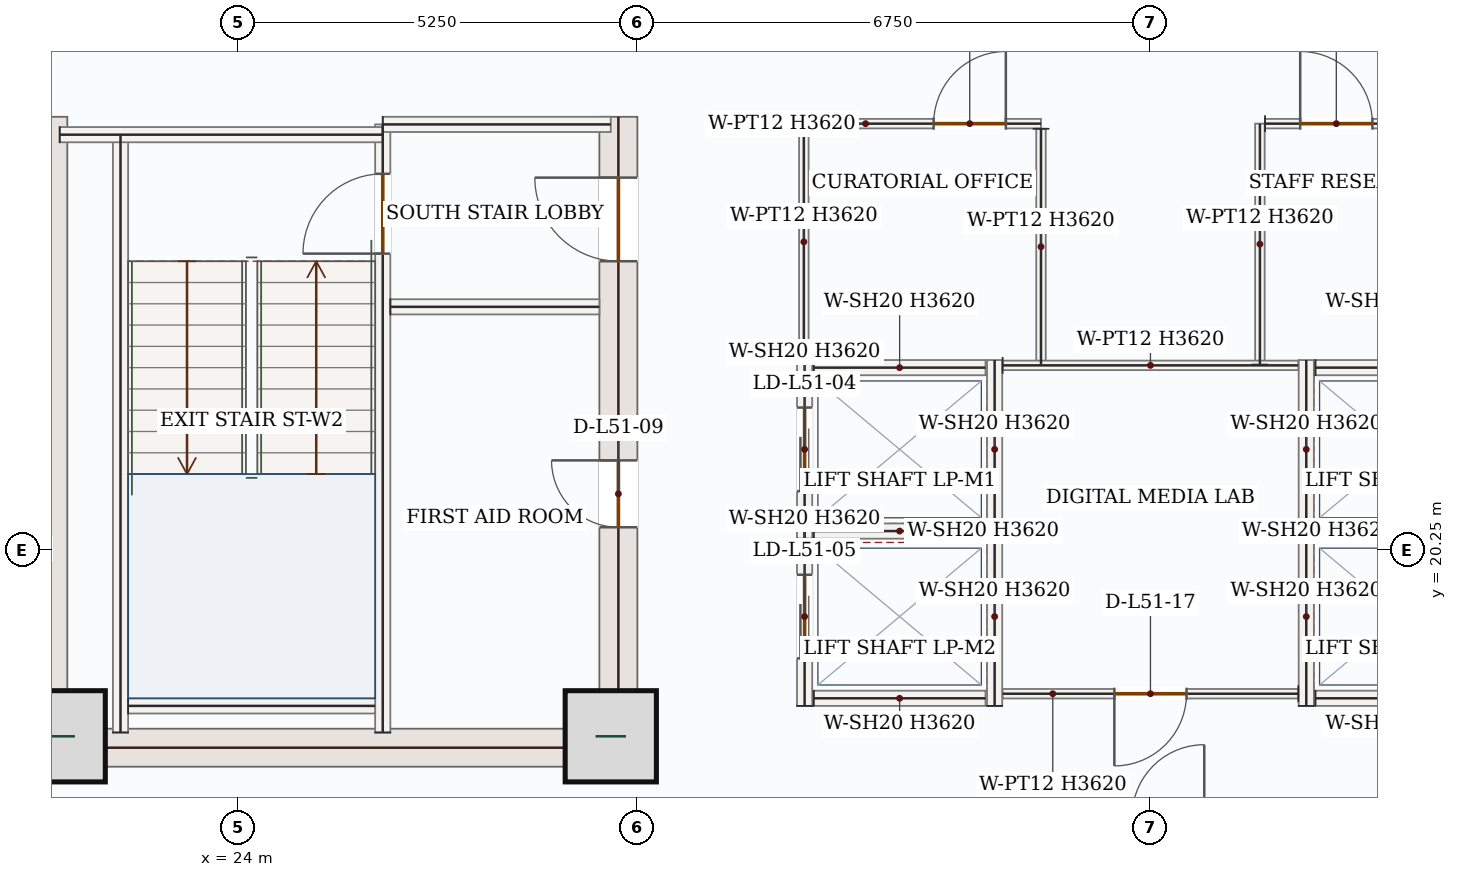
"""IFC4 building model, lengths in metres.
Left out: names, types, materials, properties, quantities, classifications, styles, units other than length and angle.
Written with IfcOpenShell. Run it as: python <this file> out.ifc"""

import sys

from ifc_helpers import new_model, si_unit, direction, frame, frame_2d, origin, origin_2d, place, context, subcontext, project, spatial, rectangle, extrude, source, transform, mapped, element, fill, save


model = new_model("IFC4")
c1 = context("Model", 3, precision=1e-05, world=origin(), true_north=direction((0.0, 1.0)))
c2 = subcontext(c1, "Body", "Model", "MODEL_VIEW")
j1 = project(units=[si_unit("LENGTHUNIT", "METRE"), si_unit("PLANEANGLEUNIT", "RADIAN")], contexts=[c1])
p1 = place(None, origin())
s1 = spatial("IfcSite", under=j1, at=p1, CompositionType="ELEMENT")
p2 = place(p1, origin())
s2 = spatial("IfcBuilding", under=s1, at=p2, CompositionType="ELEMENT")
p3 = place(p2, frame((0.0, 0.0, 217.5)))
s3 = spatial("IfcBuildingStorey", under=s2, at=p3, CompositionType="ELEMENT", Elevation=217.5)
m1 = source(origin(), c2, "Body", "SweptSolid", [
    extrude(rectangle(XDim=8.55, YDim=0.5, at=frame_2d((4.275, 0.0))), origin(), (0.0, 0.0, 1.0), 3.62),
])
p4 = place(p3, frame((21.5, 17.4, 0.0), z_axis=(0.0, 0.0, 1.0), x_axis=(0.0, 1.0, 0.0)))
e1 = element("IfcWall", 1, at=p4, inside=s3, PredefinedType="SHEAR", context=c2, shape_type="MappedRepresentation", body=[
    mapped(m1, transform((0.0, 0.0, 0.0), x_axis=(1.0, 0.0, 0.0), y_axis=(0.0, 1.0, 0.0), z_axis=(0.0, 0.0, 1.0), scale=1.0)),
])
p5 = place(p3, frame((29.0, 17.4, 0.0), z_axis=(0.0, 0.0, 1.0), x_axis=(0.0, 1.0, 0.0)))
e2 = element("IfcWall", 2, at=p5, inside=s3, PredefinedType="SHEAR", context=c2, shape_type="SweptSolid", body=[
    extrude(rectangle(XDim=8.55, YDim=0.5, at=frame_2d((4.275, 0.0))), origin(), (0.0, 0.0, 1.0), 3.62),
])
p6 = place(p5, frame((6.65, 0.0, 0.0)))
e3 = element("IfcOpeningElement", 3, at=p6, cuts=e2, PredefinedType="OPENING", context=c2, shape_type="SweptSolid", body=[
    extrude(rectangle(XDim=1.1, YDim=2.2, at=frame_2d((0.55, 1.1))), frame((0.0, 0.26, 0.0), z_axis=(0.0, -1.0, 0.0), x_axis=(1.0, 0.0, 0.0)), (0.0, 0.0, 1.0), 0.52),
])
p7 = place(p5, frame((3.15, 0.0, 0.0)))
e4 = element("IfcOpeningElement", 4, at=p7, cuts=e2, PredefinedType="OPENING", context=c2, shape_type="SweptSolid", body=[
    extrude(rectangle(XDim=0.88, YDim=2.1, at=frame_2d((0.44, 1.05))), frame((0.0, 0.26, 0.0), z_axis=(0.0, -1.0, 0.0), x_axis=(1.0, 0.0, 0.0)), (0.0, 0.0, 1.0), 0.52),
])
m2 = source(origin(), c2, "Body", "SweptSolid", [
    extrude(rectangle(XDim=7.0, YDim=0.5, at=frame_2d((3.5, 0.0))), origin(), (0.0, 0.0, 1.0), 3.62),
])
p8 = place(p3, frame((21.75, 17.65, 0.0), z_axis=(0.0, 0.0, 1.0), x_axis=(1.0, 0.0, 0.0)))
e5 = element("IfcWall", 5, at=p8, inside=s3, PredefinedType="SHEAR", context=c2, shape_type="MappedRepresentation", body=[
    mapped(m2, transform((0.0, 0.0, 0.0), x_axis=(1.0, 0.0, 0.0), y_axis=(0.0, 1.0, 0.0), z_axis=(0.0, 0.0, 1.0), scale=1.0)),
])
m3 = source(origin(), c2, "Body", "SweptSolid", [
    extrude(rectangle(XDim=1.2, YDim=1.2, at=origin_2d()), origin(), (0.0, 0.0, 1.0), 3.9),
])
for number, where, z_axis, x_axis in (
    (6, (21.65, 17.8, 0.0), (0.0, 0.0, 1.0), (1.0, 0.0, 0.0)),
    (7, (28.9, 17.8, 0.0), (0.0, 0.0, 1.0), (1.0, 0.0, 0.0)),
):
    element("IfcColumn", number, at=place(p3, frame(where, z_axis=z_axis, x_axis=x_axis)), inside=s3, PredefinedType="COLUMN", context=c2, shape_type="MappedRepresentation", body=[
        mapped(m3, transform((0.0, 0.0, 0.0), x_axis=(1.0, 0.0, 0.0), y_axis=(0.0, 1.0, 0.0), z_axis=(0.0, 0.0, 1.0), scale=1.0)),
    ])
m4 = source(origin(), c2, "Body", "SweptSolid", [
    extrude(rectangle(XDim=7.87, YDim=0.2, at=frame_2d((3.935, 0.0))), origin(), (0.0, 0.0, 1.0), 3.62),
])
p9 = place(p3, frame((22.45, 17.85, 0.0), z_axis=(0.0, 0.0, 1.0), x_axis=(0.0, 1.0, 0.0)))
e8 = element("IfcWall", 8, at=p9, inside=s3, PredefinedType="SOLIDWALL", context=c2, shape_type="MappedRepresentation", body=[
    mapped(m4, transform((0.0, 0.0, 0.0), x_axis=(1.0, 0.0, 0.0), y_axis=(0.0, 1.0, 0.0), z_axis=(0.0, 0.0, 1.0), scale=1.0)),
])
p10 = place(p3, frame((25.9, 17.85, 0.0), z_axis=(0.0, 0.0, 1.0), x_axis=(0.0, 1.0, 0.0)))
e9 = element("IfcWall", 9, at=p10, inside=s3, PredefinedType="SOLIDWALL", context=c2, shape_type="SweptSolid", body=[
    extrude(rectangle(XDim=8.0, YDim=0.2, at=frame_2d((4.0, 0.0))), origin(), (0.0, 0.0, 1.0), 3.62),
])
p11 = place(p10, frame((6.3, 0.0, 0.0)))
e10 = element("IfcOpeningElement", 10, at=p11, cuts=e9, PredefinedType="OPENING", context=c2, shape_type="SweptSolid", body=[
    extrude(rectangle(XDim=1.05, YDim=2.15, at=frame_2d((0.525, 1.075))), frame((0.0, 0.11, 0.0), z_axis=(0.0, -1.0, 0.0), x_axis=(1.0, 0.0, 0.0)), (0.0, 0.0, 1.0), 0.22),
])
m5 = source(origin(), c2, "Body", "SweptSolid", [
    extrude(rectangle(XDim=4.25, YDim=0.2, at=frame_2d((2.125, 0.0))), origin(), (0.0, 0.0, 1.0), 3.62),
])
p12 = place(p3, frame((21.65, 25.715, 0.0), z_axis=(0.0, 0.0, 1.0), x_axis=(1.0, 0.0, 0.0)))
e11 = element("IfcWall", 11, at=p12, inside=s3, PredefinedType="SOLIDWALL", context=c2, shape_type="MappedRepresentation", body=[
    mapped(m5, transform((0.0, 0.0, 0.0), x_axis=(1.0, 0.0, 0.0), y_axis=(0.0, 1.0, 0.0), z_axis=(0.0, 0.0, 1.0), scale=1.0)),
])
m6 = source(origin(), c2, "Body", "SweptSolid", [
    extrude(rectangle(XDim=3.0, YDim=0.2, at=frame_2d((1.5, 0.0))), origin(), (0.0, 0.0, 1.0), 3.62),
])
p13 = place(p3, frame((25.9, 25.85, 0.0), z_axis=(0.0, 0.0, 1.0), x_axis=(1.0, 0.0, 0.0)))
e12 = element("IfcWall", 12, at=p13, inside=s3, PredefinedType="SOLIDWALL", context=c2, shape_type="MappedRepresentation", body=[
    mapped(m6, transform((0.0, 0.0, 0.0), x_axis=(1.0, 0.0, 0.0), y_axis=(0.0, 1.0, 0.0), z_axis=(0.0, 0.0, 1.0), scale=1.0)),
])
m7 = source(origin(), c2, "Body", "SweptSolid", [
    extrude(rectangle(XDim=3.25, YDim=0.2, at=frame_2d((1.625, 0.0))), origin(), (0.0, 0.0, 1.0), 3.62),
])
p14 = place(p3, frame((22.55, 18.2, 0.0), z_axis=(0.0, 0.0, 1.0), x_axis=(1.0, 0.0, 0.0)))
e13 = element("IfcWall", 13, at=p14, inside=s3, PredefinedType="SOLIDWALL", context=c2, shape_type="MappedRepresentation", body=[
    mapped(m7, transform((0.0, 0.0, 0.0), x_axis=(1.0, 0.0, 0.0), y_axis=(0.0, 1.0, 0.0), z_axis=(0.0, 0.0, 1.0), scale=1.0)),
])
m8 = source(origin(), c2, "Body", "SweptSolid", [
    extrude(rectangle(XDim=2.75, YDim=0.2, at=frame_2d((1.375, 0.0))), origin(), (0.0, 0.0, 1.0), 3.62),
])
p15 = place(p3, frame((26.0, 23.45, 0.0), z_axis=(0.0, 0.0, 1.0), x_axis=(1.0, 0.0, 0.0)))
e14 = element("IfcWall", 14, at=p15, inside=s3, PredefinedType="SOLIDWALL", context=c2, shape_type="MappedRepresentation", body=[
    mapped(m8, transform((0.0, 0.0, 0.0), x_axis=(1.0, 0.0, 0.0), y_axis=(0.0, 1.0, 0.0), z_axis=(0.0, 0.0, 1.0), scale=1.0)),
])
p16 = place(p3, frame((31.45, 20.4, 0.0), z_axis=(0.0, 0.0, 1.0), x_axis=(0.0, 1.0, 0.0)))
e15 = element("IfcWall", 15, at=p16, inside=s3, PredefinedType="SOLIDWALL", context=c2, shape_type="SweptSolid", body=[
    extrude(rectangle(XDim=2.35, YDim=0.2, at=frame_2d((1.175, 0.0))), origin(), (0.0, 0.0, 1.0), 3.62),
])
p17 = place(p16, frame((0.625, 0.0, 0.0)))
e16 = element("IfcOpeningElement", 16, at=p17, cuts=e15, PredefinedType="OPENING", context=c2, shape_type="SweptSolid", body=[
    extrude(rectangle(XDim=1.1, YDim=2.15, at=frame_2d((0.55, 1.075))), frame((0.0, 0.11, 0.0), z_axis=(0.0, -1.0, 0.0), x_axis=(1.0, 0.0, 0.0)), (0.0, 0.0, 1.0), 0.22),
])
m9 = source(origin(), c2, "Body", "SweptSolid", [
    extrude(rectangle(XDim=2.35, YDim=0.2, at=frame_2d((1.175, 0.0))), origin(), (0.0, 0.0, 1.0), 3.62),
])
p18 = place(p3, frame((33.95, 20.4, 0.0), z_axis=(0.0, 0.0, 1.0), x_axis=(0.0, 1.0, 0.0)))
e17 = element("IfcWall", 17, at=p18, inside=s3, PredefinedType="SOLIDWALL", context=c2, shape_type="MappedRepresentation", body=[
    mapped(m9, transform((0.0, 0.0, 0.0), x_axis=(1.0, 0.0, 0.0), y_axis=(0.0, 1.0, 0.0), z_axis=(0.0, 0.0, 1.0), scale=1.0)),
])
m10 = source(origin(), c2, "Body", "SweptSolid", [
    extrude(rectangle(XDim=2.26, YDim=0.2, at=frame_2d((1.13, 0.0))), origin(), (0.0, 0.0, 1.0), 3.62),
])
for number, where, z_axis, x_axis in (
    (18, (31.57, 20.5, 0.0), (0.0, 0.0, 1.0), (1.0, 0.0, 0.0)),
    (19, (31.57, 22.65, 0.0), (0.0, 0.0, 1.0), (1.0, 0.0, 0.0)),
):
    element("IfcWall", number, at=place(p3, frame(where, z_axis=z_axis, x_axis=x_axis)), inside=s3, PredefinedType="SOLIDWALL", context=c2, shape_type="MappedRepresentation", body=[
        mapped(m10, transform((0.0, 0.0, 0.0), x_axis=(1.0, 0.0, 0.0), y_axis=(0.0, 1.0, 0.0), z_axis=(0.0, 0.0, 1.0), scale=1.0)),
    ])
p19 = place(p3, frame((31.45, 18.2, 0.0), z_axis=(0.0, 0.0, 1.0), x_axis=(0.0, 1.0, 0.0)))
e20 = element("IfcWall", 20, at=p19, inside=s3, PredefinedType="SOLIDWALL", context=c2, shape_type="SweptSolid", body=[
    extrude(rectangle(XDim=2.35, YDim=0.2, at=frame_2d((1.175, 0.0))), origin(), (0.0, 0.0, 1.0), 3.62),
])
p20 = place(p19, frame((0.625, 0.0, 0.0)))
e21 = element("IfcOpeningElement", 21, at=p20, cuts=e20, PredefinedType="OPENING", context=c2, shape_type="SweptSolid", body=[
    extrude(rectangle(XDim=1.1, YDim=2.15, at=frame_2d((0.55, 1.075))), frame((0.0, 0.11, 0.0), z_axis=(0.0, -1.0, 0.0), x_axis=(1.0, 0.0, 0.0)), (0.0, 0.0, 1.0), 0.22),
])
p21 = place(p3, frame((33.95, 18.2, 0.0), z_axis=(0.0, 0.0, 1.0), x_axis=(0.0, 1.0, 0.0)))
e22 = element("IfcWall", 22, at=p21, inside=s3, PredefinedType="SOLIDWALL", context=c2, shape_type="MappedRepresentation", body=[
    mapped(m9, transform((0.0, 0.0, 0.0), x_axis=(1.0, 0.0, 0.0), y_axis=(0.0, 1.0, 0.0), z_axis=(0.0, 0.0, 1.0), scale=1.0)),
])
p22 = place(p3, frame((31.57, 18.3, 0.0), z_axis=(0.0, 0.0, 1.0), x_axis=(1.0, 0.0, 0.0)))
e23 = element("IfcWall", 23, at=p22, inside=s3, PredefinedType="SOLIDWALL", context=c2, shape_type="MappedRepresentation", body=[
    mapped(m10, transform((0.0, 0.0, 0.0), x_axis=(1.0, 0.0, 0.0), y_axis=(0.0, 1.0, 0.0), z_axis=(0.0, 0.0, 1.0), scale=1.0)),
])
p23 = place(p3, frame((38.05, 20.4, 0.0), z_axis=(0.0, 0.0, 1.0), x_axis=(0.0, 1.0, 0.0)))
e24 = element("IfcWall", 24, at=p23, inside=s3, PredefinedType="SOLIDWALL", context=c2, shape_type="MappedRepresentation", body=[
    mapped(m9, transform((0.0, 0.0, 0.0), x_axis=(1.0, 0.0, 0.0), y_axis=(0.0, 1.0, 0.0), z_axis=(0.0, 0.0, 1.0), scale=1.0)),
])
for number, where, z_axis, x_axis in (
    (25, (38.17, 20.5, 0.0), (0.0, 0.0, 1.0), (1.0, 0.0, 0.0)),
    (26, (38.17, 22.65, 0.0), (0.0, 0.0, 1.0), (1.0, 0.0, 0.0)),
):
    element("IfcWall", number, at=place(p3, frame(where, z_axis=z_axis, x_axis=x_axis)), inside=s3, PredefinedType="SOLIDWALL", context=c2, shape_type="MappedRepresentation", body=[
        mapped(m10, transform((0.0, 0.0, 0.0), x_axis=(1.0, 0.0, 0.0), y_axis=(0.0, 1.0, 0.0), z_axis=(0.0, 0.0, 1.0), scale=1.0)),
    ])
p24 = place(p3, frame((38.05, 18.2, 0.0), z_axis=(0.0, 0.0, 1.0), x_axis=(0.0, 1.0, 0.0)))
e27 = element("IfcWall", 27, at=p24, inside=s3, PredefinedType="SOLIDWALL", context=c2, shape_type="MappedRepresentation", body=[
    mapped(m9, transform((0.0, 0.0, 0.0), x_axis=(1.0, 0.0, 0.0), y_axis=(0.0, 1.0, 0.0), z_axis=(0.0, 0.0, 1.0), scale=1.0)),
])
p25 = place(p3, frame((38.17, 18.3, 0.0), z_axis=(0.0, 0.0, 1.0), x_axis=(1.0, 0.0, 0.0)))
e28 = element("IfcWall", 28, at=p25, inside=s3, PredefinedType="SOLIDWALL", context=c2, shape_type="MappedRepresentation", body=[
    mapped(m10, transform((0.0, 0.0, 0.0), x_axis=(1.0, 0.0, 0.0), y_axis=(0.0, 1.0, 0.0), z_axis=(0.0, 0.0, 1.0), scale=1.0)),
])
m11 = source(origin(), c2, "Body", "SweptSolid", [
    extrude(rectangle(XDim=3.11, YDim=0.125, at=frame_2d((1.555, 0.0))), origin(), (0.0, 0.0, 1.0), 3.62),
])
p26 = place(p3, frame((31.44, 22.75, 0.0), z_axis=(0.0, 0.0, 1.0), x_axis=(0.0, 1.0, 0.0)))
e29 = element("IfcWall", 29, at=p26, inside=s3, PredefinedType="PARTITIONING", context=c2, shape_type="MappedRepresentation", body=[
    mapped(m11, transform((0.0, 0.0, 0.0), x_axis=(1.0, 0.0, 0.0), y_axis=(0.0, 1.0, 0.0), z_axis=(0.0, 0.0, 1.0), scale=1.0)),
])
p27 = place(p3, frame((31.508, 25.86, 0.0), z_axis=(0.0, 0.0, 1.0), x_axis=(1.0, 0.0, 0.0)))
e30 = element("IfcWall", 30, at=p27, inside=s3, PredefinedType="PARTITIONING", context=c2, shape_type="SweptSolid", body=[
    extrude(rectangle(XDim=3.052, YDim=0.125, at=frame_2d((1.526, 0.0))), origin(), (0.0, 0.0, 1.0), 3.62),
])
p28 = place(p27, frame((1.64, 0.0, 0.0)))
e31 = element("IfcOpeningElement", 31, at=p28, cuts=e30, PredefinedType="OPENING", context=c2, shape_type="SweptSolid", body=[
    extrude(rectangle(XDim=0.95, YDim=2.15, at=frame_2d((0.475, 1.075))), frame((0.0, 0.073, 0.0), z_axis=(0.0, -1.0, 0.0), x_axis=(1.0, 0.0, 0.0)), (0.0, 0.0, 1.0), 0.145),
])
m12 = source(origin(), c2, "Body", "SweptSolid", [
    extrude(rectangle(XDim=3.103, YDim=0.125, at=frame_2d((1.551, 0.0))), origin(), (0.0, 0.0, 1.0), 3.62),
])
p29 = place(p3, frame((34.56, 25.792, 0.0), z_axis=(0.0, 0.0, 1.0), x_axis=(0.0, -1.0, 0.0)))
e32 = element("IfcWall", 32, at=p29, inside=s3, PredefinedType="PARTITIONING", context=c2, shape_type="MappedRepresentation", body=[
    mapped(m12, transform((0.0, 0.0, 0.0), x_axis=(1.0, 0.0, 0.0), y_axis=(0.0, 1.0, 0.0), z_axis=(0.0, 0.0, 1.0), scale=1.0)),
])
m13 = source(origin(), c2, "Body", "SweptSolid", [
    extrude(rectangle(XDim=3.17, YDim=0.125, at=frame_2d((1.585, 0.0))), origin(), (0.0, 0.0, 1.0), 3.62),
])
p30 = place(p3, frame((37.44, 22.69, 0.0), z_axis=(0.0, 0.0, 1.0), x_axis=(0.0, 1.0, 0.0)))
e33 = element("IfcWall", 33, at=p30, inside=s3, PredefinedType="PARTITIONING", context=c2, shape_type="MappedRepresentation", body=[
    mapped(m13, transform((0.0, 0.0, 0.0), x_axis=(1.0, 0.0, 0.0), y_axis=(0.0, 1.0, 0.0), z_axis=(0.0, 0.0, 1.0), scale=1.0)),
])
p31 = place(p3, frame((37.508, 25.86, 0.0), z_axis=(0.0, 0.0, 1.0), x_axis=(1.0, 0.0, 0.0)))
e34 = element("IfcWall", 34, at=p31, inside=s3, PredefinedType="PARTITIONING", context=c2, shape_type="SweptSolid", body=[
    extrude(rectangle(XDim=3.052, YDim=0.125, at=frame_2d((1.526, 0.0))), origin(), (0.0, 0.0, 1.0), 3.62),
])
p32 = place(p31, frame((0.463, 0.0, 0.0)))
e35 = element("IfcOpeningElement", 35, at=p32, cuts=e34, PredefinedType="OPENING", context=c2, shape_type="SweptSolid", body=[
    extrude(rectangle(XDim=0.95, YDim=2.15, at=frame_2d((0.475, 1.075))), frame((0.0, 0.073, 0.0), z_axis=(0.0, -1.0, 0.0), x_axis=(1.0, 0.0, 0.0)), (0.0, 0.0, 1.0), 0.145),
])
m14 = source(origin(), c2, "Body", "SweptSolid", [
    extrude(rectangle(XDim=3.89, YDim=0.125, at=frame_2d((1.945, 0.0))), origin(), (0.0, 0.0, 1.0), 3.62),
])
p33 = place(p3, frame((34.055, 22.68, 0.0), z_axis=(0.0, 0.0, 1.0), x_axis=(1.0, 0.0, 0.0)))
e36 = element("IfcWall", 36, at=p33, inside=s3, PredefinedType="PARTITIONING", context=c2, shape_type="MappedRepresentation", body=[
    mapped(m14, transform((0.0, 0.0, 0.0), x_axis=(1.0, 0.0, 0.0), y_axis=(0.0, 1.0, 0.0), z_axis=(0.0, 0.0, 1.0), scale=1.0)),
])
p34 = place(p3, frame((37.945, 18.36, 0.0), z_axis=(0.0, 0.0, 1.0), x_axis=(-1.0, 0.0, 0.0)))
e37 = element("IfcWall", 37, at=p34, inside=s3, PredefinedType="PARTITIONING", context=c2, shape_type="SweptSolid", body=[
    extrude(rectangle(XDim=3.89, YDim=0.125, at=frame_2d((1.945, 0.0))), origin(), (0.0, 0.0, 1.0), 3.62),
])
p35 = place(p34, frame((1.47, 0.0, 0.0)))
e38 = element("IfcOpeningElement", 38, at=p35, cuts=e37, PredefinedType="OPENING", context=c2, shape_type="SweptSolid", body=[
    extrude(rectangle(XDim=0.95, YDim=2.15, at=frame_2d((0.475, 1.075))), frame((0.0, 0.073, 0.0), z_axis=(0.0, -1.0, 0.0), x_axis=(1.0, 0.0, 0.0)), (0.0, 0.0, 1.0), 0.145),
])
m15 = source(origin(), c2, "Body", "SweptSolid", [
    extrude(rectangle(XDim=1.05, YDim=2.15, at=frame_2d((0.525, 1.075))), frame((0.0, 0.025, 0.0), z_axis=(0.0, -1.0, 0.0), x_axis=(1.0, 0.0, 0.0)), (0.0, 0.0, 1.0), 0.05),
])
p36 = place(p11, origin())
e39 = element("IfcDoor", 39, at=p36, inside=s3, OperationType="SINGLE_SWING_LEFT", PredefinedType="DOOR", context=c2, shape_type="MappedRepresentation", body=[
    mapped(m15, transform((0.0, 0.0, 0.0), x_axis=(1.0, 0.0, 0.0), y_axis=(0.0, 1.0, 0.0), z_axis=(0.0, 0.0, 1.0), scale=1.0)),
])
fill(e10, e39)
m16 = source(origin(), c2, "Body", "SweptSolid", [
    extrude(rectangle(XDim=1.1, YDim=2.2, at=frame_2d((0.55, 1.1))), frame((0.0, 0.025, 0.0), z_axis=(0.0, -1.0, 0.0), x_axis=(1.0, 0.0, 0.0)), (0.0, 0.0, 1.0), 0.05),
])
p37 = place(p6, origin())
e40 = element("IfcDoor", 40, at=p37, inside=s3, OperationType="SINGLE_SWING_RIGHT", PredefinedType="DOOR", context=c2, shape_type="MappedRepresentation", body=[
    mapped(m16, transform((0.0, 0.0, 0.0), x_axis=(1.0, 0.0, 0.0), y_axis=(0.0, 1.0, 0.0), z_axis=(0.0, 0.0, 1.0), scale=1.0)),
])
fill(e3, e40)
m17 = source(origin(), c2, "Body", "SweptSolid", [
    extrude(rectangle(XDim=0.88, YDim=2.1, at=frame_2d((0.44, 1.05))), frame((0.0, 0.025, 0.0), z_axis=(0.0, -1.0, 0.0), x_axis=(1.0, 0.0, 0.0)), (0.0, 0.0, 1.0), 0.05),
])
p38 = place(p7, origin())
e41 = element("IfcDoor", 41, at=p38, inside=s3, OperationType="SINGLE_SWING_RIGHT", PredefinedType="DOOR", context=c2, shape_type="MappedRepresentation", body=[
    mapped(m17, transform((0.0, 0.0, 0.0), x_axis=(1.0, 0.0, 0.0), y_axis=(0.0, 1.0, 0.0), z_axis=(0.0, 0.0, 1.0), scale=1.0)),
])
fill(e4, e41)
m18 = source(origin(), c2, "Body", "SweptSolid", [
    extrude(rectangle(XDim=1.1, YDim=2.15, at=frame_2d((0.55, 1.075))), frame((0.0, 0.025, 0.0), z_axis=(0.0, -1.0, 0.0), x_axis=(1.0, 0.0, 0.0)), (0.0, 0.0, 1.0), 0.05),
])
p39 = place(p17, origin())
e42 = element("IfcDoor", 42, at=p39, inside=s3, OperationType="DOUBLE_DOOR_SLIDING", PredefinedType="DOOR", context=c2, shape_type="MappedRepresentation", body=[
    mapped(m18, transform((0.0, 0.0, 0.0), x_axis=(1.0, 0.0, 0.0), y_axis=(0.0, 1.0, 0.0), z_axis=(0.0, 0.0, 1.0), scale=1.0)),
])
fill(e16, e42)
p40 = place(p20, origin())
e43 = element("IfcDoor", 43, at=p40, inside=s3, OperationType="DOUBLE_DOOR_SLIDING", PredefinedType="DOOR", context=c2, shape_type="MappedRepresentation", body=[
    mapped(m18, transform((0.0, 0.0, 0.0), x_axis=(1.0, 0.0, 0.0), y_axis=(0.0, 1.0, 0.0), z_axis=(0.0, 0.0, 1.0), scale=1.0)),
])
fill(e21, e43)
m19 = source(origin(), c2, "Body", "SweptSolid", [
    extrude(rectangle(XDim=0.95, YDim=2.15, at=frame_2d((0.475, 1.075))), frame((0.0, 0.025, 0.0), z_axis=(0.0, -1.0, 0.0), x_axis=(1.0, 0.0, 0.0)), (0.0, 0.0, 1.0), 0.05),
])
p41 = place(p28, origin())
e44 = element("IfcDoor", 44, at=p41, inside=s3, OperationType="SINGLE_SWING_RIGHT", PredefinedType="DOOR", context=c2, shape_type="MappedRepresentation", body=[
    mapped(m19, transform((0.0, 0.0, 0.0), x_axis=(1.0, 0.0, 0.0), y_axis=(0.0, 1.0, 0.0), z_axis=(0.0, 0.0, 1.0), scale=1.0)),
])
fill(e31, e44)
p42 = place(p32, origin())
e45 = element("IfcDoor", 45, at=p42, inside=s3, OperationType="SINGLE_SWING_LEFT", PredefinedType="DOOR", context=c2, shape_type="MappedRepresentation", body=[
    mapped(m19, transform((0.0, 0.0, 0.0), x_axis=(1.0, 0.0, 0.0), y_axis=(0.0, 1.0, 0.0), z_axis=(0.0, 0.0, 1.0), scale=1.0)),
])
fill(e35, e45)
p43 = place(p35, origin())
e46 = element("IfcDoor", 46, at=p43, inside=s3, OperationType="SINGLE_SWING_RIGHT", PredefinedType="DOOR", context=c2, shape_type="MappedRepresentation", body=[
    mapped(m19, transform((0.0, 0.0, 0.0), x_axis=(1.0, 0.0, 0.0), y_axis=(0.0, 1.0, 0.0), z_axis=(0.0, 0.0, 1.0), scale=1.0)),
])
fill(e38, e46)
save(model, sys.argv[1])
